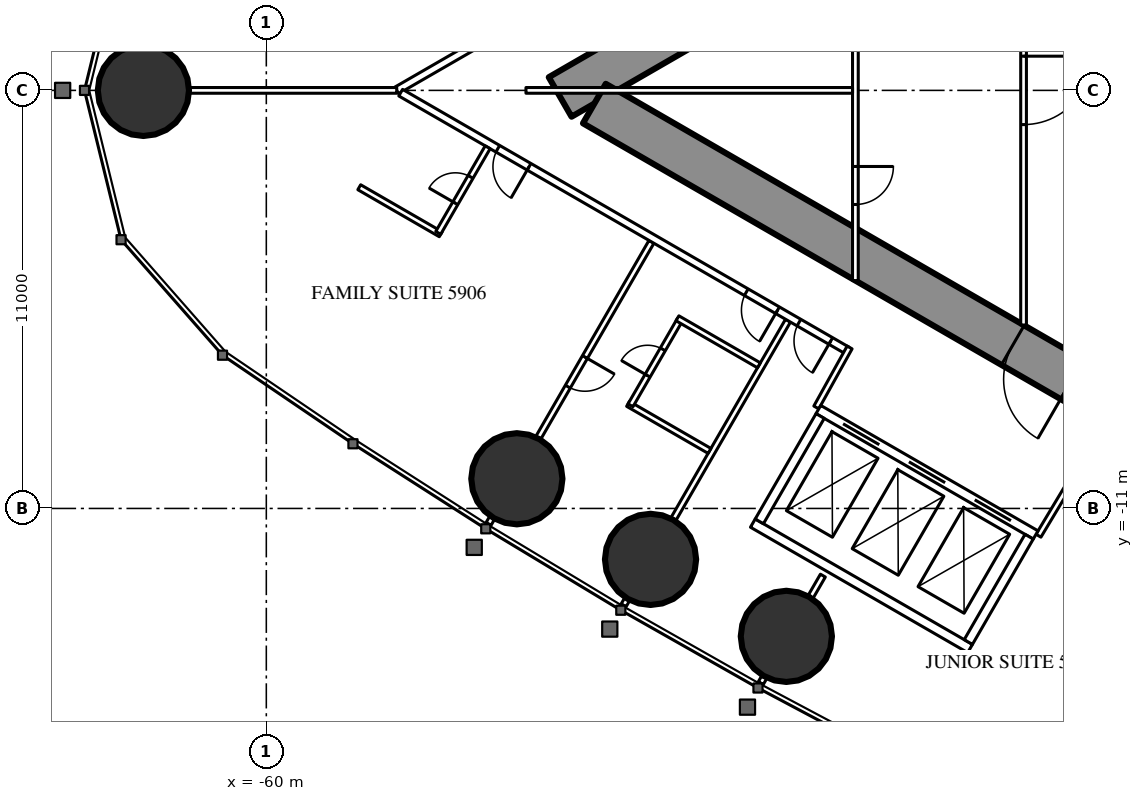
"""IFC4 building model, lengths in metres.
Left out: names, types, materials, properties, quantities, classifications, styles, units other than length and angle.
Written with IfcOpenShell. Run it as: python <this file> out.ifc"""

import sys

from ifc_helpers import new_model, si_unit, direction, frame, frame_2d, origin, origin_2d, place, context, subcontext, project, spatial, rectangle, circle, extrude, element, fill, save


model = new_model("IFC4")
c1 = context("Model", 3, precision=1e-05, world=origin(), true_north=direction((0.0, 1.0)))
c2 = subcontext(c1, "Body", "Model", "MODEL_VIEW")
j1 = project(units=[si_unit("LENGTHUNIT", "METRE"), si_unit("PLANEANGLEUNIT", "RADIAN")], contexts=[c1])
p1 = place(None, origin())
s1 = spatial("IfcSite", under=j1, at=p1, CompositionType="ELEMENT")
p2 = place(p1, origin())
s2 = spatial("IfcBuilding", under=s1, at=p2, CompositionType="ELEMENT")
p3 = place(p2, frame((0.0, 0.0, 222.5)))
s3 = spatial("IfcBuildingStorey", under=s2, at=p3, CompositionType="ELEMENT", Elevation=222.5)
for number, where, z_axis, x_axis in (
    (1, (-63.234, 0.0, 0.0), (0.0, 0.0, 1.0), (1.0, 0.0, 0.0)),
    (2, (-53.408, -10.219, 0.0), (0.0, 0.0, 1.0), (1.0, 0.0, 0.0)),
    (3, (-49.89, -12.34, 0.0), (0.0, 0.0, 1.0), (1.0, 0.0, 0.0)),
    (4, (-46.317, -14.365, 0.0), (0.0, 0.0, 1.0), (1.0, 0.0, 0.0)),
):
    element("IfcColumn", number, at=place(p3, frame(where, z_axis=z_axis, x_axis=x_axis)), inside=s3, PredefinedType="COLUMN", context=c2, shape_type="SweptSolid", body=[
        extrude(circle(Radius=1.2, at=origin_2d()), origin(), (0.0, 0.0, 1.0), 3.6),
    ])
p4 = place(p3, frame((-27.2, 14.3, 0.0), z_axis=(0.0, 0.0, 1.0), x_axis=(-0.866026593062, -0.499997940104, 0.0)))
e5 = element("IfcWall", 5, at=p4, inside=s3, PredefinedType="SHEAR", context=c2, shape_type="SweptSolid", body=[
    extrude(rectangle(XDim=28.946, YDim=1.2, at=frame_2d((14.473, 0.0))), origin(), (0.0, 0.0, 1.0), 3.6),
])
p5 = place(p4, frame((4.6, 0.0, 0.0)))
e6 = element("IfcOpeningElement", 6, at=p5, cuts=e5, PredefinedType="OPENING", context=c2, shape_type="SweptSolid", body=[
    extrude(rectangle(XDim=1.0, YDim=2.2, at=frame_2d((0.5, 1.1))), frame((0.0, 0.61, 0.0), z_axis=(0.0, -1.0, 0.0), x_axis=(1.0, 0.0, 0.0)), (0.0, 0.0, 1.0), 1.22),
])
p6 = place(p4, frame((13.395, 0.0, 0.0)))
e7 = element("IfcOpeningElement", 7, at=p6, cuts=e5, PredefinedType="OPENING", context=c2, shape_type="SweptSolid", body=[
    extrude(rectangle(XDim=1.8, YDim=2.2, at=frame_2d((0.9, 1.1))), frame((0.0, 0.61, 0.0), z_axis=(0.0, -1.0, 0.0), x_axis=(1.0, 0.0, 0.0)), (0.0, 0.0, 1.0), 1.22),
])
p7 = place(p3, frame((-27.2, -14.3, 0.0), z_axis=(0.0, 0.0, 1.0), x_axis=(-0.866024021859, 0.500002393557, 0.0)))
e8 = element("IfcWall", 8, at=p7, inside=s3, PredefinedType="SHEAR", context=c2, shape_type="SweptSolid", body=[
    extrude(rectangle(XDim=27.907, YDim=1.2, at=frame_2d((13.954, 0.0))), origin(), (0.0, 0.0, 1.0), 3.6),
])
p8 = place(p7, frame((4.6, 0.0, 0.0)))
e9 = element("IfcOpeningElement", 9, at=p8, cuts=e8, PredefinedType="OPENING", context=c2, shape_type="SweptSolid", body=[
    extrude(rectangle(XDim=1.0, YDim=2.2, at=frame_2d((0.5, 1.1))), frame((0.0, 0.61, 0.0), z_axis=(0.0, -1.0, 0.0), x_axis=(1.0, 0.0, 0.0)), (0.0, 0.0, 1.0), 1.22),
])
p9 = place(p7, frame((13.395, 0.0, 0.0)))
e10 = element("IfcOpeningElement", 10, at=p9, cuts=e8, PredefinedType="OPENING", context=c2, shape_type="SweptSolid", body=[
    extrude(rectangle(XDim=1.8, YDim=2.2, at=frame_2d((0.9, 1.1))), frame((0.0, 0.61, 0.0), z_axis=(0.0, -1.0, 0.0), x_axis=(1.0, 0.0, 0.0)), (0.0, 0.0, 1.0), 1.22),
])
p10 = place(p3, frame((-28.737, 16.068, 0.0), z_axis=(0.0, 0.0, 1.0), x_axis=(-0.866026057212, -0.499998868229, 0.0)))
e11 = element("IfcWall", 11, at=p10, inside=s3, PredefinedType="PARTITIONING", context=c2, shape_type="SweptSolid", body=[
    extrude(rectangle(XDim=32.137, YDim=0.2, at=frame_2d((16.068, 0.0))), origin(), (0.0, 0.0, 1.0), 3.35),
])
p11 = place(p10, frame((1.08, 0.0, 0.0)))
e12 = element("IfcOpeningElement", 12, at=p11, cuts=e11, PredefinedType="OPENING", context=c2, shape_type="SweptSolid", body=[
    extrude(rectangle(XDim=1.8, YDim=2.03, at=frame_2d((0.9, 1.015))), frame((0.0, 0.11, 0.0), z_axis=(0.0, -1.0, 0.0), x_axis=(1.0, 0.0, 0.0)), (0.0, 0.0, 1.0), 0.22),
])
p12 = place(p10, frame((6.86, 0.0, 0.0)))
e13 = element("IfcOpeningElement", 13, at=p12, cuts=e11, PredefinedType="OPENING", context=c2, shape_type="SweptSolid", body=[
    extrude(rectangle(XDim=1.0, YDim=2.2, at=frame_2d((0.5, 1.1))), frame((0.0, 0.11, 0.0), z_axis=(0.0, -1.0, 0.0), x_axis=(1.0, 0.0, 0.0)), (0.0, 0.0, 1.0), 0.22),
])
p13 = place(p10, frame((16.418, 0.0, 0.0)))
e14 = element("IfcOpeningElement", 14, at=p13, cuts=e11, PredefinedType="OPENING", context=c2, shape_type="SweptSolid", body=[
    extrude(rectangle(XDim=0.95, YDim=2.2, at=frame_2d((0.475, 1.1))), frame((0.0, 0.11, 0.0), z_axis=(0.0, -1.0, 0.0), x_axis=(1.0, 0.0, 0.0)), (0.0, 0.0, 1.0), 0.22),
])
p14 = place(p10, frame((20.567, 0.0, 0.0)))
e15 = element("IfcOpeningElement", 15, at=p14, cuts=e11, PredefinedType="OPENING", context=c2, shape_type="SweptSolid", body=[
    extrude(rectangle(XDim=0.95, YDim=2.2, at=frame_2d((0.475, 1.1))), frame((0.0, 0.11, 0.0), z_axis=(0.0, -1.0, 0.0), x_axis=(1.0, 0.0, 0.0)), (0.0, 0.0, 1.0), 0.22),
])
p15 = place(p10, frame((27.065, 0.0, 0.0)))
e16 = element("IfcOpeningElement", 16, at=p15, cuts=e11, PredefinedType="OPENING", context=c2, shape_type="SweptSolid", body=[
    extrude(rectangle(XDim=0.95, YDim=2.2, at=frame_2d((0.475, 1.1))), frame((0.0, 0.11, 0.0), z_axis=(0.0, -1.0, 0.0), x_axis=(1.0, 0.0, 0.0)), (0.0, 0.0, 1.0), 0.22),
])
p16 = place(p3, frame((-46.898, -15.439, 0.0), z_axis=(0.0, 0.0, 1.0), x_axis=(-0.500232303069, -0.865891241997, 0.0)))
e17 = element("IfcWall", 17, at=p16, inside=s3, PredefinedType="PARTITIONING", context=c2, shape_type="SweptSolid", body=[
    extrude(rectangle(XDim=0.18, YDim=0.15, at=frame_2d((0.09, 0.0))), origin(), (0.0, 0.0, 1.0), 2.45),
])
p17 = place(p3, frame((-46.274, -6.059, 0.0), z_axis=(0.0, 0.0, 1.0), x_axis=(-0.500020471368, -0.866013584312, 0.0)))
e18 = element("IfcWall", 18, at=p17, inside=s3, PredefinedType="PARTITIONING", context=c2, shape_type="SweptSolid", body=[
    extrude(rectangle(XDim=6.028, YDim=0.15, at=frame_2d((3.014, 0.0))), origin(), (0.0, 0.0, 1.0), 2.45),
])
p18 = place(p3, frame((-50.508, -13.392, 0.0), z_axis=(0.0, 0.0, 1.0), x_axis=(-0.499644091975, -0.866230789891, 0.0)))
e19 = element("IfcWall", 19, at=p18, inside=s3, PredefinedType="PARTITIONING", context=c2, shape_type="SweptSolid", body=[
    extrude(rectangle(XDim=0.18, YDim=0.15, at=frame_2d((0.09, 0.0))), origin(), (0.0, 0.0, 1.0), 2.45),
])
p19 = place(p3, frame((-49.866, -3.985, 0.0), z_axis=(0.0, 0.0, 1.0), x_axis=(-0.500000694566, -0.866025002776, 0.0)))
e20 = element("IfcWall", 20, at=p19, inside=s3, PredefinedType="PARTITIONING", context=c2, shape_type="SweptSolid", body=[
    extrude(rectangle(XDim=5.95, YDim=0.15, at=frame_2d((2.975, 0.0))), origin(), (0.0, 0.0, 1.0), 2.45),
])
p20 = place(p19, frame((3.5, 0.0, 0.0)))
e21 = element("IfcOpeningElement", 21, at=p20, cuts=e20, PredefinedType="OPENING", context=c2, shape_type="SweptSolid", body=[
    extrude(rectangle(XDim=0.9, YDim=2.2, at=frame_2d((0.45, 1.1))), frame((0.0, 0.085, 0.0), z_axis=(0.0, -1.0, 0.0), x_axis=(1.0, 0.0, 0.0)), (0.0, 0.0, 1.0), 0.17),
])
p21 = place(p3, frame((-54.061, -11.25, 0.0), z_axis=(0.0, 0.0, 1.0), x_axis=(-0.500391173478, -0.865799441849, 0.0)))
e22 = element("IfcWall", 22, at=p21, inside=s3, PredefinedType="PARTITIONING", context=c2, shape_type="SweptSolid", body=[
    extrude(rectangle(XDim=0.179, YDim=0.15, at=frame_2d((0.089, 0.0))), origin(), (0.0, 0.0, 1.0), 2.45),
])
p22 = place(p3, frame((-56.568, 0.0, 0.0), z_axis=(0.0, 0.0, 1.0), x_axis=(-1.0, 0.0, 0.0)))
e23 = element("IfcWall", 23, at=p22, inside=s3, PredefinedType="PARTITIONING", context=c2, shape_type="SweptSolid", body=[
    extrude(rectangle(XDim=5.446, YDim=0.15, at=frame_2d((2.723, 0.0))), origin(), (0.0, 0.0, 1.0), 2.45),
])
p23 = place(p3, frame((-45.356, -12.767, 0.0), z_axis=(0.0, 0.0, 1.0), x_axis=(-0.499886366516, -0.866091000168, 0.0)))
e24 = element("IfcWall", 24, at=p23, inside=s3, PredefinedType="PARTITIONING", context=c2, shape_type="SweptSolid", body=[
    extrude(rectangle(XDim=0.645, YDim=0.15, at=frame_2d((0.322, 0.0))), origin(), (0.0, 0.0, 1.0), 3.35),
])
p24 = place(p3, frame((-44.715, -6.844, 0.0), z_axis=(0.0, 0.0, 1.0), x_axis=(-0.866025261224, 0.500000246922, 0.0)))
e25 = element("IfcWall", 25, at=p24, inside=s3, PredefinedType="PARTITIONING", context=c2, shape_type="SweptSolid", body=[
    extrude(rectangle(XDim=13.567, YDim=0.2, at=frame_2d((6.783, 0.0))), origin(), (0.0, 0.0, 1.0), 3.35),
])
p25 = place(p24, frame((9.667, 0.0, 0.0)))
e26 = element("IfcOpeningElement", 26, at=p25, cuts=e25, PredefinedType="OPENING", context=c2, shape_type="SweptSolid", body=[
    extrude(rectangle(XDim=0.95, YDim=2.2, at=frame_2d((0.475, 1.1))), frame((0.0, 0.11, 0.0), z_axis=(0.0, -1.0, 0.0), x_axis=(1.0, 0.0, 0.0)), (0.0, 0.0, 1.0), 0.22),
])
p26 = place(p24, frame((2.117, 0.0, 0.0)))
e27 = element("IfcOpeningElement", 27, at=p26, cuts=e25, PredefinedType="OPENING", context=c2, shape_type="SweptSolid", body=[
    extrude(rectangle(XDim=0.95, YDim=2.2, at=frame_2d((0.475, 1.1))), frame((0.0, 0.11, 0.0), z_axis=(0.0, -1.0, 0.0), x_axis=(1.0, 0.0, 0.0)), (0.0, 0.0, 1.0), 0.22),
])
p27 = place(p24, frame((0.5, 0.0, 0.0)))
e28 = element("IfcOpeningElement", 28, at=p27, cuts=e25, PredefinedType="OPENING", context=c2, shape_type="SweptSolid", body=[
    extrude(rectangle(XDim=0.967, YDim=2.2, at=frame_2d((0.483, 1.1))), frame((0.0, 0.11, 0.0), z_axis=(0.0, -1.0, 0.0), x_axis=(1.0, 0.0, 0.0)), (0.0, 0.0, 1.0), 0.22),
])
for number, where, z_axis, x_axis in (
    (29, (-39.683, -11.718, 0.0), (0.0, 0.0, 1.0), (0.514, 0.858, 0.0)),
    (30, (-44.652, -6.764, 0.0), (0.0, 0.0, 1.0), (-0.485, -0.874, 0.0)),
):
    element("IfcWall", number, at=place(p3, frame(where, z_axis=z_axis, x_axis=x_axis)), inside=s3, PredefinedType="PARTITIONING", context=c2, shape_type="SweptSolid", body=[
        extrude(rectangle(XDim=1.805, YDim=0.15, at=frame_2d((0.903, 0.0))), origin(), (0.0, 0.0, 1.0), 3.35),
    ])
p28 = place(p3, frame((-55.411, -3.786, 0.0), z_axis=(0.0, 0.0, 1.0), x_axis=(-0.866006523861, 0.500032699561, 0.0)))
e31 = element("IfcWall", 31, at=p28, inside=s3, PredefinedType="PARTITIONING", context=c2, shape_type="SweptSolid", body=[
    extrude(rectangle(XDim=2.475, YDim=0.15, at=frame_2d((1.237, 0.0))), origin(), (0.0, 0.0, 1.0), 3.35),
])
p29 = place(p3, frame((-54.176, -1.497, 0.0), z_axis=(0.0, 0.0, 1.0), x_axis=(-0.500006934395, -0.866021400173, 0.0)))
e32 = element("IfcWall", 32, at=p29, inside=s3, PredefinedType="PARTITIONING", context=c2, shape_type="SweptSolid", body=[
    extrude(rectangle(XDim=2.6, YDim=0.15, at=frame_2d((1.3, 0.0))), origin(), (0.0, 0.0, 1.0), 3.35),
])
p30 = place(p29, frame((0.9, 0.0, 0.0)))
e33 = element("IfcOpeningElement", 33, at=p30, cuts=e32, PredefinedType="OPENING", context=c2, shape_type="SweptSolid", body=[
    extrude(rectangle(XDim=0.8, YDim=2.2, at=frame_2d((0.4, 1.1))), frame((0.0, 0.085, 0.0), z_axis=(0.0, -1.0, 0.0), x_axis=(1.0, 0.0, 0.0)), (0.0, 0.0, 1.0), 0.17),
])
p31 = place(p3, frame((-48.339, -9.486, 0.0), z_axis=(0.0, 0.0, 1.0), x_axis=(-0.866006523861, 0.500032699561, 0.0)))
e34 = element("IfcWall", 34, at=p31, inside=s3, PredefinedType="PARTITIONING", context=c2, shape_type="SweptSolid", body=[
    extrude(rectangle(XDim=2.475, YDim=0.15, at=frame_2d((1.237, 0.0))), origin(), (0.0, 0.0, 1.0), 3.35),
])
p32 = place(p3, frame((-49.117, -6.034, 0.0), z_axis=(0.0, 0.0, 1.0), x_axis=(-0.500006934395, -0.866021400173, 0.0)))
e35 = element("IfcWall", 35, at=p32, inside=s3, PredefinedType="PARTITIONING", context=c2, shape_type="SweptSolid", body=[
    extrude(rectangle(XDim=2.6, YDim=0.15, at=frame_2d((1.3, 0.0))), origin(), (0.0, 0.0, 1.0), 3.35),
])
p33 = place(p32, frame((0.9, 0.0, 0.0)))
e36 = element("IfcOpeningElement", 36, at=p33, cuts=e35, PredefinedType="OPENING", context=c2, shape_type="SweptSolid", body=[
    extrude(rectangle(XDim=0.8, YDim=2.2, at=frame_2d((0.4, 1.1))), frame((0.0, 0.085, 0.0), z_axis=(0.0, -1.0, 0.0), x_axis=(1.0, 0.0, 0.0)), (0.0, 0.0, 1.0), 0.17),
])
p34 = place(p3, frame((-47.039, -7.234, 0.0), z_axis=(0.0, 0.0, 1.0), x_axis=(-0.866073894602, 0.499916002032, 0.0)))
e37 = element("IfcWall", 37, at=p34, inside=s3, PredefinedType="PARTITIONING", context=c2, shape_type="SweptSolid", body=[
    extrude(rectangle(XDim=2.475, YDim=0.15, at=frame_2d((1.238, 0.0))), origin(), (0.0, 0.0, 1.0), 2.5),
])
p35 = place(p3, frame((-40.075, 6.174, 0.0), z_axis=(0.0, 0.0, 1.0), x_axis=(0.0, -1.0, 0.0)))
e38 = element("IfcWall", 38, at=p35, inside=s3, PredefinedType="PARTITIONING", context=c2, shape_type="SweptSolid", body=[
    extrude(rectangle(XDim=12.348, YDim=0.15, at=frame_2d((6.174, 0.0))), origin(), (0.0, 0.0, 1.0), 3.35),
])
p36 = place(p35, frame((5.274, 0.0, 0.0)))
e39 = element("IfcOpeningElement", 39, at=p36, cuts=e38, PredefinedType="OPENING", context=c2, shape_type="SweptSolid", body=[
    extrude(rectangle(XDim=1.8, YDim=2.2, at=frame_2d((0.9, 1.1))), frame((0.0, 0.085, 0.0), z_axis=(0.0, -1.0, 0.0), x_axis=(1.0, 0.0, 0.0)), (0.0, 0.0, 1.0), 0.17),
])
p37 = place(p3, frame((-44.5, 5.005, 0.0), z_axis=(0.0, 0.0, 1.0), x_axis=(0.0, -1.0, 0.0)))
e40 = element("IfcWall", 40, at=p37, inside=s3, PredefinedType="PARTITIONING", context=c2, shape_type="SweptSolid", body=[
    extrude(rectangle(XDim=10.009, YDim=0.15, at=frame_2d((5.005, 0.0))), origin(), (0.0, 0.0, 1.0), 2.5),
])
p38 = place(p37, frame((2.002, 0.0, 0.0)))
e41 = element("IfcOpeningElement", 41, at=p38, cuts=e40, PredefinedType="OPENING", context=c2, shape_type="SweptSolid", body=[
    extrude(rectangle(XDim=1.0, YDim=2.2, at=frame_2d((0.5, 1.1))), frame((0.0, 0.085, 0.0), z_axis=(0.0, -1.0, 0.0), x_axis=(1.0, 0.0, 0.0)), (0.0, 0.0, 1.0), 0.17),
])
p39 = place(p37, frame((7.007, 0.0, 0.0)))
e42 = element("IfcOpeningElement", 42, at=p39, cuts=e40, PredefinedType="OPENING", context=c2, shape_type="SweptSolid", body=[
    extrude(rectangle(XDim=1.0, YDim=2.2, at=frame_2d((0.5, 1.1))), frame((0.0, 0.085, 0.0), z_axis=(0.0, -1.0, 0.0), x_axis=(1.0, 0.0, 0.0)), (0.0, 0.0, 1.0), 0.17),
])
p40 = place(p3, frame((-44.575, 0.0, 0.0), z_axis=(0.0, 0.0, 1.0), x_axis=(-1.0, 0.0, 0.0)))
e43 = element("IfcWall", 43, at=p40, inside=s3, PredefinedType="PARTITIONING", context=c2, shape_type="SweptSolid", body=[
    extrude(rectangle(XDim=8.593, YDim=0.15, at=frame_2d((4.297, 0.0))), origin(), (0.0, 0.0, 1.0), 2.45),
])
p41 = place(p3, frame((-39.758, -11.697, 0.0), z_axis=(0.0, 0.0, 1.0), x_axis=(-0.866024194504, 0.500002094529, 0.0)))
e44 = element("IfcWall", 44, at=p41, inside=s3, PredefinedType="PARTITIONING", context=c2, shape_type="SweptSolid", body=[
    extrude(rectangle(XDim=6.6, YDim=0.25, at=frame_2d((3.3, 0.0))), origin(), (0.0, 0.0, 1.0), 3.35),
])
p42 = place(p41, frame((0.75, 0.0, 0.0)))
e45 = element("IfcOpeningElement", 45, at=p42, cuts=e44, PredefinedType="OPENING", context=c2, shape_type="SweptSolid", body=[
    extrude(rectangle(XDim=1.1, YDim=2.2, at=frame_2d((0.55, 1.1))), frame((0.0, 0.135, 0.0), z_axis=(0.0, -1.0, 0.0), x_axis=(1.0, 0.0, 0.0)), (0.0, 0.0, 1.0), 0.27),
])
p43 = place(p41, frame((2.75, 0.0, 0.0)))
e46 = element("IfcOpeningElement", 46, at=p43, cuts=e44, PredefinedType="OPENING", context=c2, shape_type="SweptSolid", body=[
    extrude(rectangle(XDim=1.1, YDim=2.2, at=frame_2d((0.55, 1.1))), frame((0.0, 0.135, 0.0), z_axis=(0.0, -1.0, 0.0), x_axis=(1.0, 0.0, 0.0)), (0.0, 0.0, 1.0), 0.27),
])
p44 = place(p41, frame((4.75, 0.0, 0.0)))
e47 = element("IfcOpeningElement", 47, at=p44, cuts=e44, PredefinedType="OPENING", context=c2, shape_type="SweptSolid", body=[
    extrude(rectangle(XDim=1.1, YDim=2.2, at=frame_2d((0.55, 1.1))), frame((0.0, 0.135, 0.0), z_axis=(0.0, -1.0, 0.0), x_axis=(1.0, 0.0, 0.0)), (0.0, 0.0, 1.0), 0.27),
])
p45 = place(p3, frame((-41.482, -14.686, 0.0), z_axis=(0.0, 0.0, 1.0), x_axis=(-0.86603344179, 0.499986077507, 0.0)))
e48 = element("IfcWall", 48, at=p45, inside=s3, PredefinedType="PARTITIONING", context=c2, shape_type="SweptSolid", body=[
    extrude(rectangle(XDim=6.6, YDim=0.25, at=frame_2d((3.3, 0.0))), origin(), (0.0, 0.0, 1.0), 3.35),
])
for number, where, z_axis, x_axis in (
    (49, (-39.928, -11.743, 0.0), (0.0, 0.0, 1.0), (-0.5, -0.866, 0.0)),
    (50, (-45.428, -8.568, 0.0), (0.0, 0.0, 1.0), (-0.5, -0.866, 0.0)),
):
    element("IfcWall", number, at=place(p3, frame(where, z_axis=z_axis, x_axis=x_axis)), inside=s3, PredefinedType="PARTITIONING", context=c2, shape_type="SweptSolid", body=[
        extrude(rectangle(XDim=3.201, YDim=0.25, at=frame_2d((1.6, 0.0))), origin(), (0.0, 0.0, 1.0), 3.35),
    ])
p46 = place(p30, origin())
e51 = element("IfcDoor", 51, at=p46, inside=s3, OperationType="SINGLE_SWING_RIGHT", PredefinedType="DOOR", context=c2, shape_type="SweptSolid", body=[
    extrude(rectangle(XDim=0.8, YDim=2.2, at=frame_2d((0.4, 1.1))), frame((0.0, 0.025, 0.0), z_axis=(0.0, -1.0, 0.0), x_axis=(1.0, 0.0, 0.0)), (0.0, 0.0, 1.0), 0.05),
])
fill(e33, e51)
p47 = place(p25, origin())
e52 = element("IfcDoor", 52, at=p47, inside=s3, OperationType="SINGLE_SWING_LEFT", PredefinedType="DOOR", context=c2, shape_type="SweptSolid", body=[
    extrude(rectangle(XDim=0.95, YDim=2.2, at=frame_2d((0.475, 1.1))), frame((0.0, 0.025, 0.0), z_axis=(0.0, -1.0, 0.0), x_axis=(1.0, 0.0, 0.0)), (0.0, 0.0, 1.0), 0.05),
])
fill(e26, e52)
p48 = place(p33, origin())
e53 = element("IfcDoor", 53, at=p48, inside=s3, OperationType="SINGLE_SWING_RIGHT", PredefinedType="DOOR", context=c2, shape_type="SweptSolid", body=[
    extrude(rectangle(XDim=0.8, YDim=2.2, at=frame_2d((0.4, 1.1))), frame((0.0, 0.025, 0.0), z_axis=(0.0, -1.0, 0.0), x_axis=(1.0, 0.0, 0.0)), (0.0, 0.0, 1.0), 0.05),
])
fill(e36, e53)
p49 = place(p26, origin())
e54 = element("IfcDoor", 54, at=p49, inside=s3, OperationType="SINGLE_SWING_LEFT", PredefinedType="DOOR", context=c2, shape_type="SweptSolid", body=[
    extrude(rectangle(XDim=0.95, YDim=2.2, at=frame_2d((0.475, 1.1))), frame((0.0, 0.025, 0.0), z_axis=(0.0, -1.0, 0.0), x_axis=(1.0, 0.0, 0.0)), (0.0, 0.0, 1.0), 0.05),
])
fill(e27, e54)
p50 = place(p27, origin())
e55 = element("IfcDoor", 55, at=p50, inside=s3, OperationType="SINGLE_SWING_LEFT", PredefinedType="DOOR", context=c2, shape_type="SweptSolid", body=[
    extrude(rectangle(XDim=0.967, YDim=2.2, at=frame_2d((0.483, 1.1))), frame((0.0, 0.025, 0.0), z_axis=(0.0, -1.0, 0.0), x_axis=(1.0, 0.0, 0.0)), (0.0, 0.0, 1.0), 0.05),
])
fill(e28, e55)
p51 = place(p20, origin())
e56 = element("IfcDoor", 56, at=p51, inside=s3, OperationType="SINGLE_SWING_LEFT", PredefinedType="DOOR", context=c2, shape_type="SweptSolid", body=[
    extrude(rectangle(XDim=0.9, YDim=2.2, at=frame_2d((0.45, 1.1))), frame((0.0, 0.025, 0.0), z_axis=(0.0, -1.0, 0.0), x_axis=(1.0, 0.0, 0.0)), (0.0, 0.0, 1.0), 0.05),
])
fill(e21, e56)
p52 = place(p36, origin())
e57 = element("IfcDoor", 57, at=p52, inside=s3, OperationType="DOUBLE_DOOR_SINGLE_SWING", PredefinedType="DOOR", context=c2, shape_type="SweptSolid", body=[
    extrude(rectangle(XDim=1.8, YDim=2.2, at=frame_2d((0.9, 1.1))), frame((0.0, 0.025, 0.0), z_axis=(0.0, -1.0, 0.0), x_axis=(1.0, 0.0, 0.0)), (0.0, 0.0, 1.0), 0.05),
])
fill(e39, e57)
p53 = place(p39, origin())
e58 = element("IfcDoor", 58, at=p53, inside=s3, OperationType="SINGLE_SWING_LEFT", PredefinedType="DOOR", context=c2, shape_type="SweptSolid", body=[
    extrude(rectangle(XDim=1.0, YDim=2.2, at=frame_2d((0.5, 1.1))), frame((0.0, 0.025, 0.0), z_axis=(0.0, -1.0, 0.0), x_axis=(1.0, 0.0, 0.0)), (0.0, 0.0, 1.0), 0.05),
])
fill(e42, e58)
p54 = place(p9, origin())
e59 = element("IfcDoor", 59, at=p54, inside=s3, OperationType="DOUBLE_DOOR_SINGLE_SWING", PredefinedType="DOOR", context=c2, shape_type="SweptSolid", body=[
    extrude(rectangle(XDim=1.8, YDim=2.2, at=frame_2d((0.9, 1.1))), frame((0.0, 0.025, 0.0), z_axis=(0.0, -1.0, 0.0), x_axis=(1.0, 0.0, 0.0)), (0.0, 0.0, 1.0), 0.05),
])
fill(e10, e59)
p55 = place(p42, origin())
e60 = element("IfcDoor", 60, at=p55, inside=s3, OperationType="DOUBLE_DOOR_SLIDING", PredefinedType="USERDEFINED", context=c2, shape_type="SweptSolid", body=[
    extrude(rectangle(XDim=1.1, YDim=2.2, at=frame_2d((0.55, 1.1))), frame((0.0, 0.025, 0.0), z_axis=(0.0, -1.0, 0.0), x_axis=(1.0, 0.0, 0.0)), (0.0, 0.0, 1.0), 0.05),
])
fill(e45, e60)
p56 = place(p43, origin())
e61 = element("IfcDoor", 61, at=p56, inside=s3, OperationType="DOUBLE_DOOR_SLIDING", PredefinedType="USERDEFINED", context=c2, shape_type="SweptSolid", body=[
    extrude(rectangle(XDim=1.1, YDim=2.2, at=frame_2d((0.55, 1.1))), frame((0.0, 0.025, 0.0), z_axis=(0.0, -1.0, 0.0), x_axis=(1.0, 0.0, 0.0)), (0.0, 0.0, 1.0), 0.05),
])
fill(e46, e61)
p57 = place(p44, origin())
e62 = element("IfcDoor", 62, at=p57, inside=s3, OperationType="DOUBLE_DOOR_SLIDING", PredefinedType="USERDEFINED", context=c2, shape_type="SweptSolid", body=[
    extrude(rectangle(XDim=1.1, YDim=2.2, at=frame_2d((0.55, 1.1))), frame((0.0, 0.025, 0.0), z_axis=(0.0, -1.0, 0.0), x_axis=(1.0, 0.0, 0.0)), (0.0, 0.0, 1.0), 0.05),
])
fill(e47, e62)
save(model, sys.argv[1])
